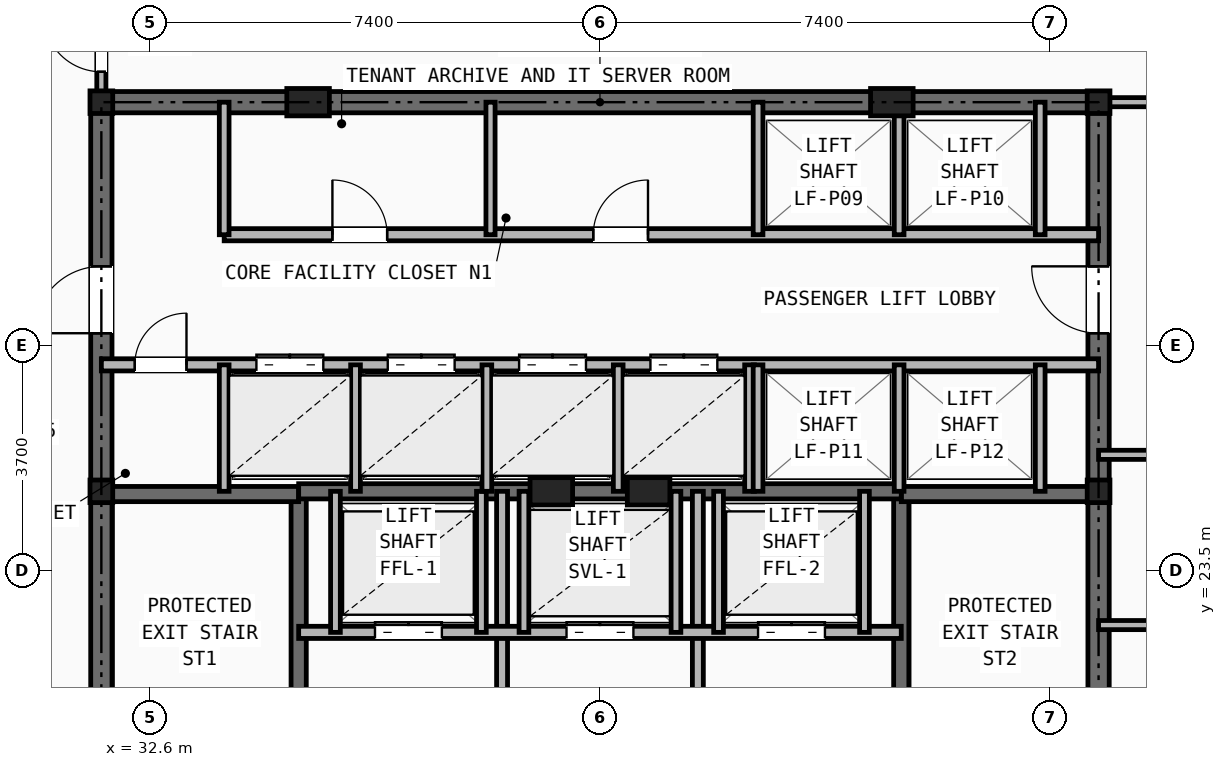
"""IFC4 building model, lengths in metres.
Left out: names, types, materials, properties, quantities, classifications, styles, units other than length and angle.
Written with IfcOpenShell. Run it as: python <this file> out.ifc"""

import sys

from ifc_helpers import new_model, si_unit, direction, frame, frame_2d, origin, origin_2d, place, context, subcontext, project, spatial, rectangle, i_section, extrude, element, fill, save


model = new_model("IFC4")
c1 = context("Model", 3, precision=1e-05, world=origin(), true_north=direction((0.0, 1.0)))
c2 = subcontext(c1, "Body", "Model", "MODEL_VIEW")
j1 = project(units=[si_unit("LENGTHUNIT", "METRE"), si_unit("PLANEANGLEUNIT", "RADIAN")], contexts=[c1])
p1 = place(None, origin())
s1 = spatial("IfcSite", under=j1, at=p1, CompositionType="ELEMENT")
p2 = place(p1, origin())
s2 = spatial("IfcBuilding", under=s1, at=p2, CompositionType="ELEMENT")
p3 = place(p2, frame((0.0, 0.0, 186.15)))
s3 = spatial("IfcBuildingStorey", under=s2, at=p3, CompositionType="ELEMENT", Elevation=186.15)
for number, where, z_axis, x_axis in (
    (1, (31.8, 24.8, 0.0), (0.0, 0.0, 1.0), (1.0, 0.0, 0.0)),
    (2, (48.2, 24.8, 0.0), (0.0, 0.0, 1.0), (1.0, 0.0, 0.0)),
    (3, (31.8, 31.2, 0.0), (0.0, 0.0, 1.0), (1.0, 0.0, 0.0)),
    (4, (48.2, 31.2, 0.0), (0.0, 0.0, 1.0), (1.0, 0.0, 0.0)),
):
    element("IfcColumn", number, at=place(p3, frame(where, z_axis=z_axis, x_axis=x_axis)), inside=s3, PredefinedType="COLUMN", context=c2, shape_type="SweptSolid", body=[
        extrude(i_section(OverallWidth=0.374, OverallDepth=0.372, WebThickness=0.016, FlangeThickness=0.026, at=origin_2d()), origin(), (0.0, 0.0, 1.0), 3.45),
    ])
for number, where, z_axis, x_axis in (
    (5, (35.2, 31.2, 0.0), (0.0, 0.0, 1.0), (1.0, 0.0, 0.0)),
    (6, (44.8, 31.2, 0.0), (0.0, 0.0, 1.0), (1.0, 0.0, 0.0)),
    (7, (39.2, 24.8, 0.0), (0.0, 0.0, 1.0), (1.0, 0.0, 0.0)),
    (8, (40.8, 24.8, 0.0), (0.0, 0.0, 1.0), (1.0, 0.0, 0.0)),
):
    element("IfcColumn", number, at=place(p3, frame(where, z_axis=z_axis, x_axis=x_axis)), inside=s3, PredefinedType="PILASTER", context=c2, shape_type="SweptSolid", body=[
        extrude(rectangle(XDim=0.7, YDim=0.45, at=origin_2d()), origin(), (0.0, 0.0, 1.0), 3.45),
    ])
p4 = place(p3, frame((31.8, 31.2, 0.0), z_axis=(0.0, 0.0, 1.0), x_axis=(1.0, 0.0, 0.0)))
e9 = element("IfcWall", 9, at=p4, inside=s3, PredefinedType="SHEAR", context=c2, shape_type="SweptSolid", body=[
    extrude(rectangle(XDim=16.4, YDim=0.35, at=frame_2d((8.2, 0.0))), origin(), (0.0, 0.0, 1.0), 3.21),
])
p5 = place(p3, frame((31.8, 16.4, 0.0), z_axis=(0.0, 0.0, 1.0), x_axis=(0.0, 1.0, 0.0)))
e10 = element("IfcWall", 10, at=p5, inside=s3, PredefinedType="SHEAR", context=c2, shape_type="SweptSolid", body=[
    extrude(rectangle(XDim=14.8, YDim=0.35, at=frame_2d((7.4, 0.0))), origin(), (0.0, 0.0, 1.0), 3.21),
])
p6 = place(p5, frame((11.0, 0.0, 0.0)))
e11 = element("IfcOpeningElement", 11, at=p6, cuts=e10, PredefinedType="OPENING", context=c2, shape_type="SweptSolid", body=[
    extrude(rectangle(XDim=1.1, YDim=2.15, at=frame_2d((0.55, 1.075))), frame((0.0, 0.185, 0.0), z_axis=(0.0, -1.0, 0.0), x_axis=(1.0, 0.0, 0.0)), (0.0, 0.0, 1.0), 0.37),
])
p7 = place(p3, frame((48.2, 16.4, 0.0), z_axis=(0.0, 0.0, 1.0), x_axis=(0.0, 1.0, 0.0)))
e12 = element("IfcWall", 12, at=p7, inside=s3, PredefinedType="SHEAR", context=c2, shape_type="SweptSolid", body=[
    extrude(rectangle(XDim=14.8, YDim=0.35, at=frame_2d((7.4, 0.0))), origin(), (0.0, 0.0, 1.0), 3.21),
])
p8 = place(p7, frame((11.0, 0.0, 0.0)))
e13 = element("IfcOpeningElement", 13, at=p8, cuts=e12, PredefinedType="OPENING", context=c2, shape_type="SweptSolid", body=[
    extrude(rectangle(XDim=1.1, YDim=2.15, at=frame_2d((0.55, 1.075))), frame((0.0, 0.185, 0.0), z_axis=(0.0, -1.0, 0.0), x_axis=(1.0, 0.0, 0.0)), (0.0, 0.0, 1.0), 0.37),
])
p9 = place(p3, frame((35.045, 16.4, 0.0), z_axis=(0.0, 0.0, 1.0), x_axis=(0.0, 1.0, 0.0)))
e14 = element("IfcWall", 14, at=p9, inside=s3, PredefinedType="SHEAR", context=c2, shape_type="SweptSolid", body=[
    extrude(rectangle(XDim=8.4, YDim=0.25, at=frame_2d((4.2, 0.0))), origin(), (0.0, 0.0, 1.0), 3.21),
])
p10 = place(p9, frame((0.45, 0.0, 0.0)))
e15 = element("IfcOpeningElement", 15, at=p10, cuts=e14, PredefinedType="OPENING", context=c2, shape_type="SweptSolid", body=[
    extrude(rectangle(XDim=0.95, YDim=2.1, at=frame_2d((0.475, 1.05))), frame((0.0, 0.135, 0.0), z_axis=(0.0, -1.0, 0.0), x_axis=(1.0, 0.0, 0.0)), (0.0, 0.0, 1.0), 0.27),
])
p11 = place(p3, frame((31.8, 24.755, 0.0), z_axis=(0.0, 0.0, 1.0), x_axis=(1.0, 0.0, 0.0)))
e16 = element("IfcWall", 16, at=p11, inside=s3, PredefinedType="SHEAR", context=c2, shape_type="SweptSolid", body=[
    extrude(rectangle(XDim=3.245, YDim=0.25, at=frame_2d((1.623, 0.0))), origin(), (0.0, 0.0, 1.0), 3.21),
])
p12 = place(p3, frame((44.955, 16.4, 0.0), z_axis=(0.0, 0.0, 1.0), x_axis=(0.0, 1.0, 0.0)))
e17 = element("IfcWall", 17, at=p12, inside=s3, PredefinedType="SHEAR", context=c2, shape_type="SweptSolid", body=[
    extrude(rectangle(XDim=8.4, YDim=0.25, at=frame_2d((4.2, 0.0))), origin(), (0.0, 0.0, 1.0), 3.21),
])
p13 = place(p12, frame((0.45, 0.0, 0.0)))
e18 = element("IfcOpeningElement", 18, at=p13, cuts=e17, PredefinedType="OPENING", context=c2, shape_type="SweptSolid", body=[
    extrude(rectangle(XDim=0.95, YDim=2.1, at=frame_2d((0.475, 1.05))), frame((0.0, 0.135, 0.0), z_axis=(0.0, -1.0, 0.0), x_axis=(1.0, 0.0, 0.0)), (0.0, 0.0, 1.0), 0.27),
])
p14 = place(p3, frame((44.955, 24.755, 0.0), z_axis=(0.0, 0.0, 1.0), x_axis=(1.0, 0.0, 0.0)))
e19 = element("IfcWall", 19, at=p14, inside=s3, PredefinedType="SHEAR", context=c2, shape_type="SweptSolid", body=[
    extrude(rectangle(XDim=3.245, YDim=0.25, at=frame_2d((1.623, 0.0))), origin(), (0.0, 0.0, 1.0), 3.21),
])
p15 = place(p3, frame((35.045, 24.8, 0.0), z_axis=(0.0, 0.0, 1.0), x_axis=(1.0, 0.0, 0.0)))
e20 = element("IfcWall", 20, at=p15, inside=s3, PredefinedType="SHEAR", context=c2, shape_type="SweptSolid", body=[
    extrude(rectangle(XDim=9.91, YDim=0.25, at=frame_2d((4.955, 0.0))), origin(), (0.0, 0.0, 1.0), 3.21),
])
p16 = place(p3, frame((38.39, 16.4, 0.0), z_axis=(0.0, 0.0, 1.0), x_axis=(0.0, 1.0, 0.0)))
e21 = element("IfcWall", 21, at=p16, inside=s3, PredefinedType="PARTITIONING", context=c2, shape_type="SweptSolid", body=[
    extrude(rectangle(XDim=8.4, YDim=0.18, at=frame_2d((4.2, 0.0))), origin(), (0.0, 0.0, 1.0), 2.665),
])
p17 = place(p16, frame((3.85, 0.0, 0.0)))
e22 = element("IfcOpeningElement", 22, at=p17, cuts=e21, PredefinedType="OPENING", context=c2, shape_type="SweptSolid", body=[
    extrude(rectangle(XDim=0.95, YDim=2.1, at=frame_2d((0.475, 1.05))), frame((0.0, 0.1, 0.0), z_axis=(0.0, -1.0, 0.0), x_axis=(1.0, 0.0, 0.0)), (0.0, 0.0, 1.0), 0.2),
])
p18 = place(p3, frame((41.61, 16.4, 0.0), z_axis=(0.0, 0.0, 1.0), x_axis=(0.0, 1.0, 0.0)))
e23 = element("IfcWall", 23, at=p18, inside=s3, PredefinedType="PARTITIONING", context=c2, shape_type="SweptSolid", body=[
    extrude(rectangle(XDim=8.4, YDim=0.18, at=frame_2d((4.2, 0.0))), origin(), (0.0, 0.0, 1.0), 2.665),
])
p19 = place(p3, frame((35.045, 22.48, 0.0), z_axis=(0.0, 0.0, 1.0), x_axis=(1.0, 0.0, 0.0)))
e24 = element("IfcWall", 24, at=p19, inside=s3, PredefinedType="SOLIDWALL", context=c2, shape_type="SweptSolid", body=[
    extrude(rectangle(XDim=9.91, YDim=0.2, at=frame_2d((4.955, 0.0))), origin(), (0.0, 0.0, 1.0), 3.21),
])
p20 = place(p19, frame((1.255, 0.0, 0.0)))
e25 = element("IfcOpeningElement", 25, at=p20, cuts=e24, PredefinedType="OPENING", context=c2, shape_type="SweptSolid", body=[
    extrude(rectangle(XDim=1.1, YDim=2.15, at=frame_2d((0.55, 1.075))), frame((0.0, 0.11, 0.0), z_axis=(0.0, -1.0, 0.0), x_axis=(1.0, 0.0, 0.0)), (0.0, 0.0, 1.0), 0.22),
])
p21 = place(p19, frame((7.555, 0.0, 0.0)))
e26 = element("IfcOpeningElement", 26, at=p21, cuts=e24, PredefinedType="OPENING", context=c2, shape_type="SweptSolid", body=[
    extrude(rectangle(XDim=1.1, YDim=2.15, at=frame_2d((0.55, 1.075))), frame((0.0, 0.11, 0.0), z_axis=(0.0, -1.0, 0.0), x_axis=(1.0, 0.0, 0.0)), (0.0, 0.0, 1.0), 0.22),
])
p22 = place(p19, frame((4.405, 0.0, 0.0)))
e27 = element("IfcOpeningElement", 27, at=p22, cuts=e24, PredefinedType="OPENING", context=c2, shape_type="SweptSolid", body=[
    extrude(rectangle(XDim=1.1, YDim=2.15, at=frame_2d((0.55, 1.075))), frame((0.0, 0.11, 0.0), z_axis=(0.0, -1.0, 0.0), x_axis=(1.0, 0.0, 0.0)), (0.0, 0.0, 1.0), 0.22),
])
for number, where, z_axis, x_axis in (
    (28, (35.65, 22.48, 0.0), (0.0, 0.0, 1.0), (0.0, 1.0, 0.0)),
    (29, (38.05, 22.48, 0.0), (0.0, 0.0, 1.0), (0.0, 1.0, 0.0)),
    (30, (41.95, 22.48, 0.0), (0.0, 0.0, 1.0), (0.0, 1.0, 0.0)),
    (31, (44.35, 22.48, 0.0), (0.0, 0.0, 1.0), (0.0, 1.0, 0.0)),
    (32, (38.75, 22.48, 0.0), (0.0, 0.0, 1.0), (0.0, 1.0, 0.0)),
    (33, (41.25, 22.48, 0.0), (0.0, 0.0, 1.0), (0.0, 1.0, 0.0)),
):
    element("IfcWall", number, at=place(p3, frame(where, z_axis=z_axis, x_axis=x_axis)), inside=s3, PredefinedType="SOLIDWALL", context=c2, shape_type="SweptSolid", body=[
        extrude(rectangle(XDim=2.32, YDim=0.16, at=frame_2d((1.16, 0.0))), origin(), (0.0, 0.0, 1.0), 3.21),
    ])
p23 = place(p3, frame((33.82, 29.02, 0.0), z_axis=(0.0, 0.0, 1.0), x_axis=(1.0, 0.0, 0.0)))
e34 = element("IfcWall", 34, at=p23, inside=s3, PredefinedType="SOLIDWALL", context=c2, shape_type="SweptSolid", body=[
    extrude(rectangle(XDim=14.38, YDim=0.2, at=frame_2d((7.19, 0.0))), origin(), (0.0, 0.0, 1.0), 2.665),
])
p24 = place(p23, frame((1.78, 0.0, 0.0)))
e35 = element("IfcOpeningElement", 35, at=p24, cuts=e34, PredefinedType="OPENING", context=c2, shape_type="SweptSolid", body=[
    extrude(rectangle(XDim=0.9, YDim=2.1, at=frame_2d((0.45, 1.05))), frame((0.0, 0.11, 0.0), z_axis=(0.0, -1.0, 0.0), x_axis=(1.0, 0.0, 0.0)), (0.0, 0.0, 1.0), 0.22),
])
p25 = place(p23, frame((6.07, 0.0, 0.0)))
e36 = element("IfcOpeningElement", 36, at=p25, cuts=e34, PredefinedType="OPENING", context=c2, shape_type="SweptSolid", body=[
    extrude(rectangle(XDim=0.9, YDim=2.1, at=frame_2d((0.45, 1.05))), frame((0.0, 0.11, 0.0), z_axis=(0.0, -1.0, 0.0), x_axis=(1.0, 0.0, 0.0)), (0.0, 0.0, 1.0), 0.22),
])
p26 = place(p3, frame((31.8, 26.88, 0.0), z_axis=(0.0, 0.0, 1.0), x_axis=(1.0, 0.0, 0.0)))
e37 = element("IfcWall", 37, at=p26, inside=s3, PredefinedType="SOLIDWALL", context=c2, shape_type="SweptSolid", body=[
    extrude(rectangle(XDim=16.4, YDim=0.2, at=frame_2d((8.2, 0.0))), origin(), (0.0, 0.0, 1.0), 2.665),
])
p27 = place(p26, frame((0.55, 0.0, 0.0)))
e38 = element("IfcOpeningElement", 38, at=p27, cuts=e37, PredefinedType="OPENING", context=c2, shape_type="SweptSolid", body=[
    extrude(rectangle(XDim=0.85, YDim=2.05, at=frame_2d((0.425, 1.025))), frame((0.0, 0.11, 0.0), z_axis=(0.0, -1.0, 0.0), x_axis=(1.0, 0.0, 0.0)), (0.0, 0.0, 1.0), 0.22),
])
p28 = place(p26, frame((2.55, 0.0, 0.0)))
e39 = element("IfcOpeningElement", 39, at=p28, cuts=e37, PredefinedType="OPENING", context=c2, shape_type="SweptSolid", body=[
    extrude(rectangle(XDim=1.1, YDim=2.15, at=frame_2d((0.55, 1.075))), frame((0.0, 0.11, 0.0), z_axis=(0.0, -1.0, 0.0), x_axis=(1.0, 0.0, 0.0)), (0.0, 0.0, 1.0), 0.22),
])
p29 = place(p26, frame((4.71, 0.0, 0.0)))
e40 = element("IfcOpeningElement", 40, at=p29, cuts=e37, PredefinedType="OPENING", context=c2, shape_type="SweptSolid", body=[
    extrude(rectangle(XDim=1.1, YDim=2.15, at=frame_2d((0.55, 1.075))), frame((0.0, 0.11, 0.0), z_axis=(0.0, -1.0, 0.0), x_axis=(1.0, 0.0, 0.0)), (0.0, 0.0, 1.0), 0.22),
])
p30 = place(p26, frame((6.87, 0.0, 0.0)))
e41 = element("IfcOpeningElement", 41, at=p30, cuts=e37, PredefinedType="OPENING", context=c2, shape_type="SweptSolid", body=[
    extrude(rectangle(XDim=1.1, YDim=2.15, at=frame_2d((0.55, 1.075))), frame((0.0, 0.11, 0.0), z_axis=(0.0, -1.0, 0.0), x_axis=(1.0, 0.0, 0.0)), (0.0, 0.0, 1.0), 0.22),
])
p31 = place(p26, frame((9.03, 0.0, 0.0)))
e42 = element("IfcOpeningElement", 42, at=p31, cuts=e37, PredefinedType="OPENING", context=c2, shape_type="SweptSolid", body=[
    extrude(rectangle(XDim=1.1, YDim=2.15, at=frame_2d((0.55, 1.075))), frame((0.0, 0.11, 0.0), z_axis=(0.0, -1.0, 0.0), x_axis=(1.0, 0.0, 0.0)), (0.0, 0.0, 1.0), 0.22),
])
p32 = place(p3, frame((33.82, 29.02, 0.0), z_axis=(0.0, 0.0, 1.0), x_axis=(0.0, 1.0, 0.0)))
e43 = element("IfcWall", 43, at=p32, inside=s3, PredefinedType="SOLIDWALL", context=c2, shape_type="SweptSolid", body=[
    extrude(rectangle(XDim=2.18, YDim=0.16, at=frame_2d((1.09, 0.0))), origin(), (0.0, 0.0, 1.0), 2.665),
])
p33 = place(p3, frame((33.82, 24.8, 0.0), z_axis=(0.0, 0.0, 1.0), x_axis=(0.0, 1.0, 0.0)))
e44 = element("IfcWall", 44, at=p33, inside=s3, PredefinedType="SOLIDWALL", context=c2, shape_type="SweptSolid", body=[
    extrude(rectangle(XDim=2.08, YDim=0.16, at=frame_2d((1.04, 0.0))), origin(), (0.0, 0.0, 1.0), 3.21),
])
p34 = place(p3, frame((38.2, 29.02, 0.0), z_axis=(0.0, 0.0, 1.0), x_axis=(0.0, 1.0, 0.0)))
e45 = element("IfcWall", 45, at=p34, inside=s3, PredefinedType="PARTITIONING", context=c2, shape_type="SweptSolid", body=[
    extrude(rectangle(XDim=2.18, YDim=0.15, at=frame_2d((1.09, 0.0))), origin(), (0.0, 0.0, 1.0), 2.665),
])
for number, where, z_axis, x_axis in (
    (46, (35.98, 24.8, 0.0), (0.0, 0.0, 1.0), (0.0, 1.0, 0.0)),
    (47, (38.14, 24.8, 0.0), (0.0, 0.0, 1.0), (0.0, 1.0, 0.0)),
    (48, (40.3, 24.8, 0.0), (0.0, 0.0, 1.0), (0.0, 1.0, 0.0)),
    (49, (42.46, 24.8, 0.0), (0.0, 0.0, 1.0), (0.0, 1.0, 0.0)),
):
    element("IfcWall", number, at=place(p3, frame(where, z_axis=z_axis, x_axis=x_axis)), inside=s3, PredefinedType="SOLIDWALL", context=c2, shape_type="SweptSolid", body=[
        extrude(rectangle(XDim=2.08, YDim=0.16, at=frame_2d((1.04, 0.0))), origin(), (0.0, 0.0, 1.0), 3.21),
    ])
for number, where, z_axis, x_axis in (
    (50, (42.6, 29.02, 0.0), (0.0, 0.0, 1.0), (0.0, 1.0, 0.0)),
    (51, (44.92, 29.02, 0.0), (0.0, 0.0, 1.0), (0.0, 1.0, 0.0)),
    (52, (47.24, 29.02, 0.0), (0.0, 0.0, 1.0), (0.0, 1.0, 0.0)),
):
    element("IfcWall", number, at=place(p3, frame(where, z_axis=z_axis, x_axis=x_axis)), inside=s3, PredefinedType="SOLIDWALL", context=c2, shape_type="SweptSolid", body=[
        extrude(rectangle(XDim=2.18, YDim=0.16, at=frame_2d((1.09, 0.0))), origin(), (0.0, 0.0, 1.0), 2.665),
    ])
for number, where, z_axis, x_axis in (
    (53, (42.6, 24.8, 0.0), (0.0, 0.0, 1.0), (0.0, 1.0, 0.0)),
    (54, (44.92, 24.8, 0.0), (0.0, 0.0, 1.0), (0.0, 1.0, 0.0)),
    (55, (47.24, 24.8, 0.0), (0.0, 0.0, 1.0), (0.0, 1.0, 0.0)),
):
    element("IfcWall", number, at=place(p3, frame(where, z_axis=z_axis, x_axis=x_axis)), inside=s3, PredefinedType="SOLIDWALL", context=c2, shape_type="SweptSolid", body=[
        extrude(rectangle(XDim=2.08, YDim=0.16, at=frame_2d((1.04, 0.0))), origin(), (0.0, 0.0, 1.0), 3.21),
    ])
p35 = place(p3, frame((31.8, 31.2, 0.0), z_axis=(0.0, 0.0, 1.0), x_axis=(0.0, 1.0, 0.0)))
e56 = element("IfcWall", 56, at=p35, inside=s3, PredefinedType="PARTITIONING", context=c2, shape_type="SweptSolid", body=[
    extrude(rectangle(XDim=5.3, YDim=0.15, at=frame_2d((2.65, 0.0))), origin(), (0.0, 0.0, 1.0), 2.252),
])
p36 = place(p35, frame((0.5, 0.0, 0.0)))
e57 = element("IfcOpeningElement", 57, at=p36, cuts=e56, PredefinedType="OPENING", context=c2, shape_type="SweptSolid", body=[
    extrude(rectangle(XDim=0.95, YDim=2.1, at=frame_2d((0.475, 1.05))), frame((0.0, 0.085, 0.0), z_axis=(0.0, -1.0, 0.0), x_axis=(1.0, 0.0, 0.0)), (0.0, 0.0, 1.0), 0.17),
])
p37 = place(p3, frame((48.2, 31.2, 0.0), z_axis=(0.0, 0.0, 1.0), x_axis=(1.0, 0.0, 0.0)))
e58 = element("IfcWall", 58, at=p37, inside=s3, PredefinedType="PARTITIONING", context=c2, shape_type="SweptSolid", body=[
    extrude(rectangle(XDim=7.165, YDim=0.15, at=frame_2d((3.582, 0.0))), origin(), (0.0, 0.0, 1.0), 2.252),
])
p38 = place(p3, frame((48.2, 22.6, 0.0), z_axis=(0.0, 0.0, 1.0), x_axis=(1.0, 0.0, 0.0)))
e59 = element("IfcWall", 59, at=p38, inside=s3, PredefinedType="PARTITIONING", context=c2, shape_type="SweptSolid", body=[
    extrude(rectangle(XDim=12.652, YDim=0.15, at=frame_2d((6.326, 0.0))), origin(), (0.0, 0.0, 1.0), 2.589),
])
p39 = place(p38, frame((1.4, 0.0, 0.0)))
e60 = element("IfcOpeningElement", 60, at=p39, cuts=e59, PredefinedType="OPENING", context=c2, shape_type="SweptSolid", body=[
    extrude(rectangle(XDim=0.95, YDim=2.1, at=frame_2d((0.475, 1.05))), frame((0.0, 0.085, 0.0), z_axis=(0.0, -1.0, 0.0), x_axis=(1.0, 0.0, 0.0)), (0.0, 0.0, 1.0), 0.17),
])
p40 = place(p3, frame((48.2, 25.4, 0.0), z_axis=(0.0, 0.0, 1.0), x_axis=(1.0, 0.0, 0.0)))
e61 = element("IfcWall", 61, at=p40, inside=s3, PredefinedType="PARTITIONING", context=c2, shape_type="SweptSolid", body=[
    extrude(rectangle(XDim=10.865, YDim=0.15, at=frame_2d((5.433, 0.0))), origin(), (0.0, 0.0, 1.0), 2.589),
])
p41 = place(p40, frame((1.4, 0.0, 0.0)))
e62 = element("IfcOpeningElement", 62, at=p41, cuts=e61, PredefinedType="OPENING", context=c2, shape_type="SweptSolid", body=[
    extrude(rectangle(XDim=0.95, YDim=2.1, at=frame_2d((0.475, 1.05))), frame((0.0, 0.085, 0.0), z_axis=(0.0, -1.0, 0.0), x_axis=(1.0, 0.0, 0.0)), (0.0, 0.0, 1.0), 0.17),
])
p42 = place(p20, origin())
e63 = element("IfcDoor", 63, at=p42, inside=s3, OperationType="DOUBLE_DOOR_SLIDING", PredefinedType="DOOR", context=c2, shape_type="SweptSolid", body=[
    extrude(rectangle(XDim=1.1, YDim=2.15, at=frame_2d((0.55, 1.075))), frame((0.0, 0.025, 0.0), z_axis=(0.0, -1.0, 0.0), x_axis=(1.0, 0.0, 0.0)), (0.0, 0.0, 1.0), 0.05),
])
fill(e25, e63)
p43 = place(p21, origin())
e64 = element("IfcDoor", 64, at=p43, inside=s3, OperationType="DOUBLE_DOOR_SLIDING", PredefinedType="DOOR", context=c2, shape_type="SweptSolid", body=[
    extrude(rectangle(XDim=1.1, YDim=2.15, at=frame_2d((0.55, 1.075))), frame((0.0, 0.025, 0.0), z_axis=(0.0, -1.0, 0.0), x_axis=(1.0, 0.0, 0.0)), (0.0, 0.0, 1.0), 0.05),
])
fill(e26, e64)
p44 = place(p22, origin())
e65 = element("IfcDoor", 65, at=p44, inside=s3, OperationType="DOUBLE_DOOR_SLIDING", PredefinedType="DOOR", context=c2, shape_type="SweptSolid", body=[
    extrude(rectangle(XDim=1.1, YDim=2.15, at=frame_2d((0.55, 1.075))), frame((0.0, 0.025, 0.0), z_axis=(0.0, -1.0, 0.0), x_axis=(1.0, 0.0, 0.0)), (0.0, 0.0, 1.0), 0.05),
])
fill(e27, e65)
p45 = place(p27, origin())
e66 = element("IfcDoor", 66, at=p45, inside=s3, OperationType="SINGLE_SWING_RIGHT", PredefinedType="DOOR", context=c2, shape_type="SweptSolid", body=[
    extrude(rectangle(XDim=0.85, YDim=2.05, at=frame_2d((0.425, 1.025))), frame((0.0, 0.025, 0.0), z_axis=(0.0, -1.0, 0.0), x_axis=(1.0, 0.0, 0.0)), (0.0, 0.0, 1.0), 0.05),
])
fill(e38, e66)
p46 = place(p6, origin())
e67 = element("IfcDoor", 67, at=p46, inside=s3, OperationType="SINGLE_SWING_LEFT", PredefinedType="DOOR", context=c2, shape_type="SweptSolid", body=[
    extrude(rectangle(XDim=1.1, YDim=2.15, at=frame_2d((0.55, 1.075))), frame((0.0, 0.025, 0.0), z_axis=(0.0, -1.0, 0.0), x_axis=(1.0, 0.0, 0.0)), (0.0, 0.0, 1.0), 0.05),
])
fill(e11, e67)
p47 = place(p8, origin())
e68 = element("IfcDoor", 68, at=p47, inside=s3, OperationType="SINGLE_SWING_RIGHT", PredefinedType="DOOR", context=c2, shape_type="SweptSolid", body=[
    extrude(rectangle(XDim=1.1, YDim=2.15, at=frame_2d((0.55, 1.075))), frame((0.0, 0.025, 0.0), z_axis=(0.0, -1.0, 0.0), x_axis=(1.0, 0.0, 0.0)), (0.0, 0.0, 1.0), 0.05),
])
fill(e13, e68)
p48 = place(p24, origin())
e69 = element("IfcDoor", 69, at=p48, inside=s3, OperationType="SINGLE_SWING_LEFT", PredefinedType="DOOR", context=c2, shape_type="SweptSolid", body=[
    extrude(rectangle(XDim=0.9, YDim=2.1, at=frame_2d((0.45, 1.05))), frame((0.0, 0.025, 0.0), z_axis=(0.0, -1.0, 0.0), x_axis=(1.0, 0.0, 0.0)), (0.0, 0.0, 1.0), 0.05),
])
fill(e35, e69)
p49 = place(p25, origin())
e70 = element("IfcDoor", 70, at=p49, inside=s3, OperationType="SINGLE_SWING_RIGHT", PredefinedType="DOOR", context=c2, shape_type="SweptSolid", body=[
    extrude(rectangle(XDim=0.9, YDim=2.1, at=frame_2d((0.45, 1.05))), frame((0.0, 0.025, 0.0), z_axis=(0.0, -1.0, 0.0), x_axis=(1.0, 0.0, 0.0)), (0.0, 0.0, 1.0), 0.05),
])
fill(e36, e70)
p50 = place(p28, origin())
e71 = element("IfcDoor", 71, at=p50, inside=s3, OperationType="DOUBLE_DOOR_SLIDING", PredefinedType="DOOR", context=c2, shape_type="SweptSolid", body=[
    extrude(rectangle(XDim=1.1, YDim=2.15, at=frame_2d((0.55, 1.075))), frame((0.0, 0.025, 0.0), z_axis=(0.0, -1.0, 0.0), x_axis=(1.0, 0.0, 0.0)), (0.0, 0.0, 1.0), 0.05),
])
fill(e39, e71)
p51 = place(p29, origin())
e72 = element("IfcDoor", 72, at=p51, inside=s3, OperationType="DOUBLE_DOOR_SLIDING", PredefinedType="DOOR", context=c2, shape_type="SweptSolid", body=[
    extrude(rectangle(XDim=1.1, YDim=2.15, at=frame_2d((0.55, 1.075))), frame((0.0, 0.025, 0.0), z_axis=(0.0, -1.0, 0.0), x_axis=(1.0, 0.0, 0.0)), (0.0, 0.0, 1.0), 0.05),
])
fill(e40, e72)
p52 = place(p30, origin())
e73 = element("IfcDoor", 73, at=p52, inside=s3, OperationType="DOUBLE_DOOR_SLIDING", PredefinedType="DOOR", context=c2, shape_type="SweptSolid", body=[
    extrude(rectangle(XDim=1.1, YDim=2.15, at=frame_2d((0.55, 1.075))), frame((0.0, 0.025, 0.0), z_axis=(0.0, -1.0, 0.0), x_axis=(1.0, 0.0, 0.0)), (0.0, 0.0, 1.0), 0.05),
])
fill(e41, e73)
p53 = place(p31, origin())
e74 = element("IfcDoor", 74, at=p53, inside=s3, OperationType="DOUBLE_DOOR_SLIDING", PredefinedType="DOOR", context=c2, shape_type="SweptSolid", body=[
    extrude(rectangle(XDim=1.1, YDim=2.15, at=frame_2d((0.55, 1.075))), frame((0.0, 0.025, 0.0), z_axis=(0.0, -1.0, 0.0), x_axis=(1.0, 0.0, 0.0)), (0.0, 0.0, 1.0), 0.05),
])
fill(e42, e74)
p54 = place(p36, origin())
e75 = element("IfcDoor", 75, at=p54, inside=s3, OperationType="SINGLE_SWING_RIGHT", PredefinedType="DOOR", context=c2, shape_type="SweptSolid", body=[
    extrude(rectangle(XDim=0.95, YDim=2.1, at=frame_2d((0.475, 1.05))), frame((0.0, 0.025, 0.0), z_axis=(0.0, -1.0, 0.0), x_axis=(1.0, 0.0, 0.0)), (0.0, 0.0, 1.0), 0.05),
])
fill(e57, e75)
save(model, sys.argv[1])
